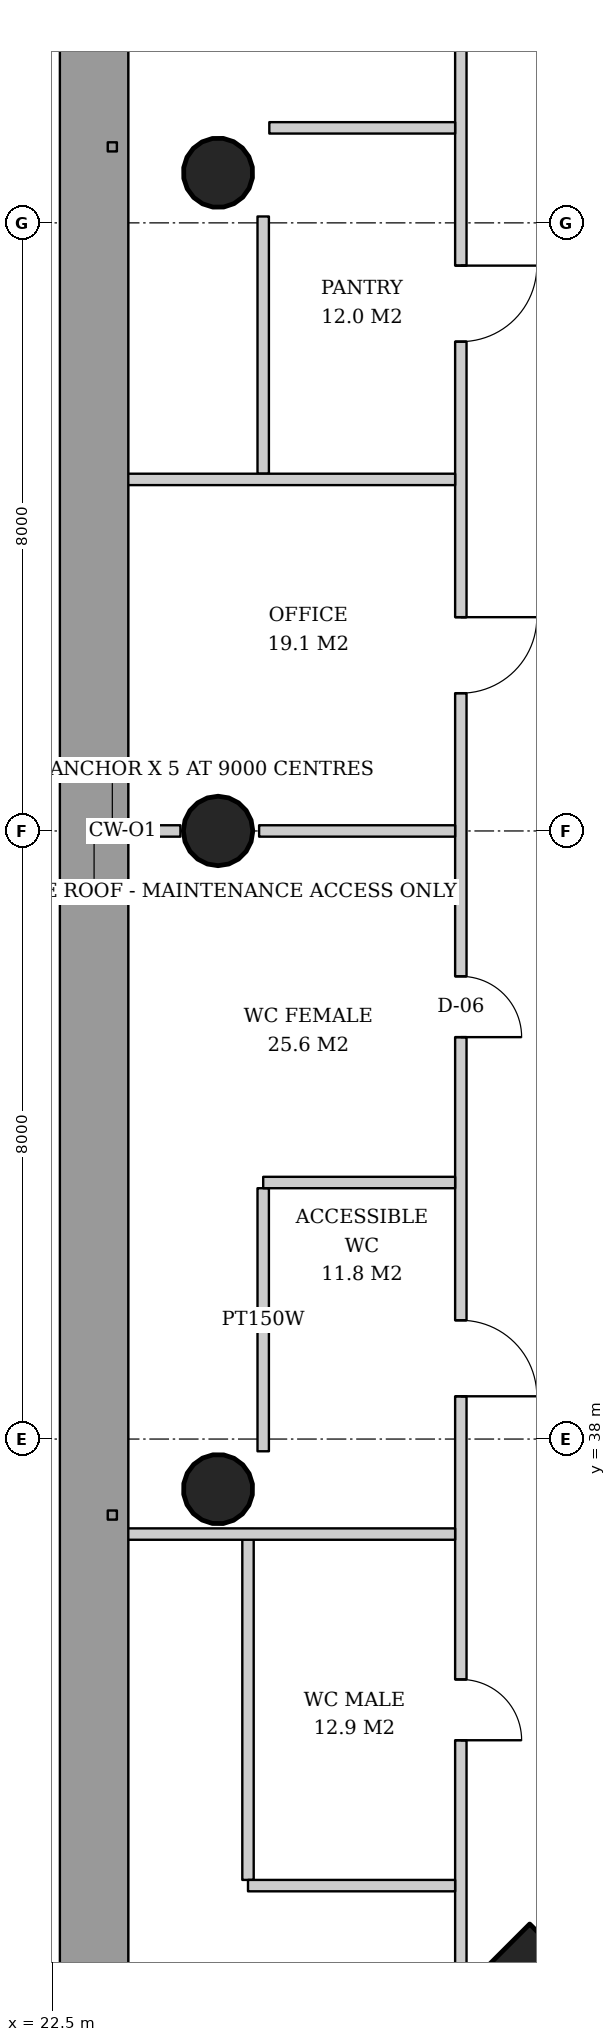
"""IFC4 building model, lengths in metres.
Left out: names, types, materials, properties, quantities, classifications, styles, units other than length and angle.
Written with IfcOpenShell. Run it as: python <this file> out.ifc"""

import sys

from ifc_helpers import new_model, si_unit, direction, frame, frame_2d, origin, origin_2d, place, context, subcontext, project, spatial, rectangle, hollow_circle, extrude, element, fill, save


model = new_model("IFC4")
c1 = context("Model", 3, precision=1e-05, world=origin(), true_north=direction((0.0, 1.0)))
c2 = subcontext(c1, "Body", "Model", "MODEL_VIEW")
j1 = project(units=[si_unit("LENGTHUNIT", "METRE"), si_unit("PLANEANGLEUNIT", "RADIAN")], contexts=[c1])
p1 = place(None, origin())
s1 = spatial("IfcSite", under=j1, at=p1, CompositionType="ELEMENT")
p2 = place(p1, origin())
s2 = spatial("IfcBuilding", under=s1, at=p2, CompositionType="ELEMENT")
p3 = place(p2, frame((0.0, 0.0, 135.0)))
s3 = spatial("IfcBuildingStorey", under=s2, at=p3, CompositionType="ELEMENT", Elevation=135.0)
p4 = place(p3, frame((28.743, 29.743, 0.0), z_axis=(0.031898107953, 0.031898107953, 0.998981992539), x_axis=(-0.707106781187, 0.707106781187, 0.0)))
e1 = element("IfcColumn", 1, at=p4, inside=s3, PredefinedType="COLUMN", context=c2, shape_type="SweptSolid", body=[
    extrude(rectangle(XDim=2.6, YDim=2.6, at=origin_2d()), origin(), (0.0, 0.0, 1.0), 3.804),
])
p5 = place(p3, frame((24.643, 54.678, 0.0), z_axis=(0.031974442509, -0.015923015547, 0.999361842679), x_axis=(0.445775033553, 0.895145027055, 0.0)))
e2 = element("IfcColumn", 2, at=p5, inside=s3, PredefinedType="COLUMN", context=c2, shape_type="SweptSolid", body=[
    extrude(hollow_circle(Radius=0.457, WallThickness=0.03, at=origin_2d()), origin(), (0.0, 0.0, 1.0), 3.802),
])
p6 = place(p3, frame((24.643, 46.0, 0.0), z_axis=(0.031978496719, 0.0, 0.999488557087), x_axis=(0.0, 1.0, 0.0)))
e3 = element("IfcColumn", 3, at=p6, inside=s3, PredefinedType="COLUMN", context=c2, shape_type="SweptSolid", body=[
    extrude(hollow_circle(Radius=0.457, WallThickness=0.03, at=origin_2d()), origin(), (0.0, 0.0, 1.0), 3.802),
])
p7 = place(p3, frame((24.643, 37.322, 0.0), z_axis=(0.031974442509, 0.015923015547, 0.999361842679), x_axis=(-0.445775033553, 0.895145027055, 0.0)))
e4 = element("IfcColumn", 4, at=p7, inside=s3, PredefinedType="COLUMN", context=c2, shape_type="SweptSolid", body=[
    extrude(hollow_circle(Radius=0.457, WallThickness=0.03, at=origin_2d()), origin(), (0.0, 0.0, 1.0), 3.802),
])
p8 = place(p3, frame((25.275, 54.084, 0.0), z_axis=(0.0, 0.0, 1.0), x_axis=(0.0, -1.0, 0.0)))
e5 = element("IfcWall", 5, at=p8, inside=s3, PredefinedType="PARTITIONING", context=c2, shape_type="SweptSolid", body=[
    extrude(rectangle(XDim=3.384, YDim=0.15, at=frame_2d((1.692, 0.0))), origin(), (0.0, 0.0, 1.0), 2.858),
])
p9 = place(p3, frame((25.275, 41.3, 0.0), z_axis=(0.0, 0.0, 1.0), x_axis=(0.0, -1.0, 0.0)))
e6 = element("IfcWall", 6, at=p9, inside=s3, PredefinedType="PARTITIONING", context=c2, shape_type="SweptSolid", body=[
    extrude(rectangle(XDim=3.461, YDim=0.15, at=frame_2d((1.73, 0.0))), origin(), (0.0, 0.0, 1.0), 2.806),
])
p10 = place(p3, frame((25.075, 36.815, 0.0), z_axis=(0.0, 0.0, 1.0), x_axis=(0.0, -1.0, 0.0)))
e7 = element("IfcWall", 7, at=p10, inside=s3, PredefinedType="PARTITIONING", context=c2, shape_type="SweptSolid", body=[
    extrude(rectangle(XDim=4.615, YDim=0.15, at=frame_2d((2.308, 0.0))), origin(), (0.0, 0.0, 1.0), 2.806),
])
p11 = place(p3, frame((27.875, 61.211, 0.0), z_axis=(0.0, 0.0, 1.0), x_axis=(0.0, -1.0, 0.0)))
e8 = element("IfcWall", 8, at=p11, inside=s3, PredefinedType="PARTITIONING", context=c2, shape_type="SweptSolid", body=[
    extrude(rectangle(XDim=30.423, YDim=0.15, at=frame_2d((15.211, 0.0))), origin(), (0.0, 0.0, 1.0), 2.72),
])
p12 = place(p11, frame((3.149, 0.0, 0.0)))
e9 = element("IfcOpeningElement", 9, at=p12, cuts=e8, PredefinedType="OPENING", context=c2, shape_type="SweptSolid", body=[
    extrude(rectangle(XDim=1.0, YDim=2.1, at=frame_2d((0.5, 1.05))), frame((0.0, 0.085, 0.0), z_axis=(0.0, -1.0, 0.0), x_axis=(1.0, 0.0, 0.0)), (0.0, 0.0, 1.0), 0.17),
])
p13 = place(p11, frame((7.774, 0.0, 0.0)))
e10 = element("IfcOpeningElement", 10, at=p13, cuts=e8, PredefinedType="OPENING", context=c2, shape_type="SweptSolid", body=[
    extrude(rectangle(XDim=1.0, YDim=2.1, at=frame_2d((0.5, 1.05))), frame((0.0, 0.085, 0.0), z_axis=(0.0, -1.0, 0.0), x_axis=(1.0, 0.0, 0.0)), (0.0, 0.0, 1.0), 0.17),
])
p14 = place(p11, frame((12.399, 0.0, 0.0)))
e11 = element("IfcOpeningElement", 11, at=p14, cuts=e8, PredefinedType="OPENING", context=c2, shape_type="SweptSolid", body=[
    extrude(rectangle(XDim=1.0, YDim=2.1, at=frame_2d((0.5, 1.05))), frame((0.0, 0.085, 0.0), z_axis=(0.0, -1.0, 0.0), x_axis=(1.0, 0.0, 0.0)), (0.0, 0.0, 1.0), 0.17),
])
p15 = place(p11, frame((17.124, 0.0, 0.0)))
e12 = element("IfcOpeningElement", 12, at=p15, cuts=e8, PredefinedType="OPENING", context=c2, shape_type="SweptSolid", body=[
    extrude(rectangle(XDim=0.8, YDim=2.1, at=frame_2d((0.4, 1.05))), frame((0.0, 0.085, 0.0), z_axis=(0.0, -1.0, 0.0), x_axis=(1.0, 0.0, 0.0)), (0.0, 0.0, 1.0), 0.17),
])
p16 = place(p11, frame((21.649, 0.0, 0.0)))
e13 = element("IfcOpeningElement", 13, at=p16, cuts=e8, PredefinedType="OPENING", context=c2, shape_type="SweptSolid", body=[
    extrude(rectangle(XDim=1.0, YDim=2.1, at=frame_2d((0.5, 1.05))), frame((0.0, 0.085, 0.0), z_axis=(0.0, -1.0, 0.0), x_axis=(1.0, 0.0, 0.0)), (0.0, 0.0, 1.0), 0.17),
])
p17 = place(p11, frame((26.374, 0.0, 0.0)))
e14 = element("IfcOpeningElement", 14, at=p17, cuts=e8, PredefinedType="OPENING", context=c2, shape_type="SweptSolid", body=[
    extrude(rectangle(XDim=0.8, YDim=2.1, at=frame_2d((0.4, 1.05))), frame((0.0, 0.085, 0.0), z_axis=(0.0, -1.0, 0.0), x_axis=(1.0, 0.0, 0.0)), (0.0, 0.0, 1.0), 0.17),
])
p18 = place(p3, frame((27.8, 55.25, 0.0), z_axis=(0.0, 0.0, 1.0), x_axis=(-1.0, 0.0, 0.0)))
e15 = element("IfcWall", 15, at=p18, inside=s3, PredefinedType="PARTITIONING", context=c2, shape_type="SweptSolid", body=[
    extrude(rectangle(XDim=2.445, YDim=0.15, at=frame_2d((1.222, 0.0))), origin(), (0.0, 0.0, 1.0), 3.62),
])
p19 = place(p3, frame((27.8, 50.625, 0.0), z_axis=(0.0, 0.0, 1.0), x_axis=(-1.0, 0.0, 0.0)))
e16 = element("IfcWall", 16, at=p19, inside=s3, PredefinedType="PARTITIONING", context=c2, shape_type="SweptSolid", body=[
    extrude(rectangle(XDim=4.34, YDim=0.15, at=frame_2d((2.17, 0.0))), origin(), (0.0, 0.0, 1.0), 2.82),
])
p20 = place(p3, frame((27.8, 46.0, 0.0), z_axis=(0.0, 0.0, 1.0), x_axis=(-1.0, 0.0, 0.0)))
e17 = element("IfcWall", 17, at=p20, inside=s3, PredefinedType="PARTITIONING", context=c2, shape_type="SweptSolid", body=[
    extrude(rectangle(XDim=2.579, YDim=0.15, at=frame_2d((1.29, 0.0))), origin(), (0.0, 0.0, 1.0), 3.62),
])
p21 = place(p3, frame((24.186, 46.0, 0.0), z_axis=(0.0, 0.0, 1.0), x_axis=(-1.0, 0.0, 0.0)))
e18 = element("IfcWall", 18, at=p21, inside=s3, PredefinedType="PARTITIONING", context=c2, shape_type="SweptSolid", body=[
    extrude(rectangle(XDim=0.726, YDim=0.15, at=frame_2d((0.363, 0.0))), origin(), (0.0, 0.0, 1.0), 3.62),
])
p22 = place(p3, frame((27.8, 41.375, 0.0), z_axis=(0.0, 0.0, 1.0), x_axis=(-1.0, 0.0, 0.0)))
e19 = element("IfcWall", 19, at=p22, inside=s3, PredefinedType="PARTITIONING", context=c2, shape_type="SweptSolid", body=[
    extrude(rectangle(XDim=2.525, YDim=0.15, at=frame_2d((1.263, 0.0))), origin(), (0.0, 0.0, 1.0), 3.62),
])
p23 = place(p3, frame((27.8, 36.75, 0.0), z_axis=(0.0, 0.0, 1.0), x_axis=(-1.0, 0.0, 0.0)))
e20 = element("IfcWall", 20, at=p23, inside=s3, PredefinedType="PARTITIONING", context=c2, shape_type="SweptSolid", body=[
    extrude(rectangle(XDim=4.34, YDim=0.15, at=frame_2d((2.17, 0.0))), origin(), (0.0, 0.0, 1.0), 2.82),
])
p24 = place(p3, frame((27.8, 32.125, 0.0), z_axis=(0.0, 0.0, 1.0), x_axis=(-1.0, 0.0, 0.0)))
e21 = element("IfcWall", 21, at=p24, inside=s3, PredefinedType="PARTITIONING", context=c2, shape_type="SweptSolid", body=[
    extrude(rectangle(XDim=2.725, YDim=0.15, at=frame_2d((1.363, 0.0))), origin(), (0.0, 0.0, 1.0), 3.62),
])
p25 = place(p13, origin())
e22 = element("IfcDoor", 22, at=p25, inside=s3, OperationType="SINGLE_SWING_LEFT", PredefinedType="DOOR", context=c2, shape_type="SweptSolid", body=[
    extrude(rectangle(XDim=1.0, YDim=2.1, at=frame_2d((0.5, 1.05))), frame((0.0, 0.025, 0.0), z_axis=(0.0, -1.0, 0.0), x_axis=(1.0, 0.0, 0.0)), (0.0, 0.0, 1.0), 0.05),
])
fill(e10, e22)
p26 = place(p14, origin())
e23 = element("IfcDoor", 23, at=p26, inside=s3, OperationType="SINGLE_SWING_LEFT", PredefinedType="DOOR", context=c2, shape_type="SweptSolid", body=[
    extrude(rectangle(XDim=1.0, YDim=2.1, at=frame_2d((0.5, 1.05))), frame((0.0, 0.025, 0.0), z_axis=(0.0, -1.0, 0.0), x_axis=(1.0, 0.0, 0.0)), (0.0, 0.0, 1.0), 0.05),
])
fill(e11, e23)
p27 = place(p15, origin())
e24 = element("IfcDoor", 24, at=p27, inside=s3, OperationType="SINGLE_SWING_RIGHT", PredefinedType="DOOR", context=c2, shape_type="SweptSolid", body=[
    extrude(rectangle(XDim=0.8, YDim=2.1, at=frame_2d((0.4, 1.05))), frame((0.0, 0.025, 0.0), z_axis=(0.0, -1.0, 0.0), x_axis=(1.0, 0.0, 0.0)), (0.0, 0.0, 1.0), 0.05),
])
fill(e12, e24)
p28 = place(p16, origin())
e25 = element("IfcDoor", 25, at=p28, inside=s3, OperationType="SINGLE_SWING_RIGHT", PredefinedType="DOOR", context=c2, shape_type="SweptSolid", body=[
    extrude(rectangle(XDim=1.0, YDim=2.1, at=frame_2d((0.5, 1.05))), frame((0.0, 0.025, 0.0), z_axis=(0.0, -1.0, 0.0), x_axis=(1.0, 0.0, 0.0)), (0.0, 0.0, 1.0), 0.05),
])
fill(e13, e25)
p29 = place(p17, origin())
e26 = element("IfcDoor", 26, at=p29, inside=s3, OperationType="SINGLE_SWING_RIGHT", PredefinedType="DOOR", context=c2, shape_type="SweptSolid", body=[
    extrude(rectangle(XDim=0.8, YDim=2.1, at=frame_2d((0.4, 1.05))), frame((0.0, 0.025, 0.0), z_axis=(0.0, -1.0, 0.0), x_axis=(1.0, 0.0, 0.0)), (0.0, 0.0, 1.0), 0.05),
])
fill(e14, e26)
save(model, sys.argv[1])
